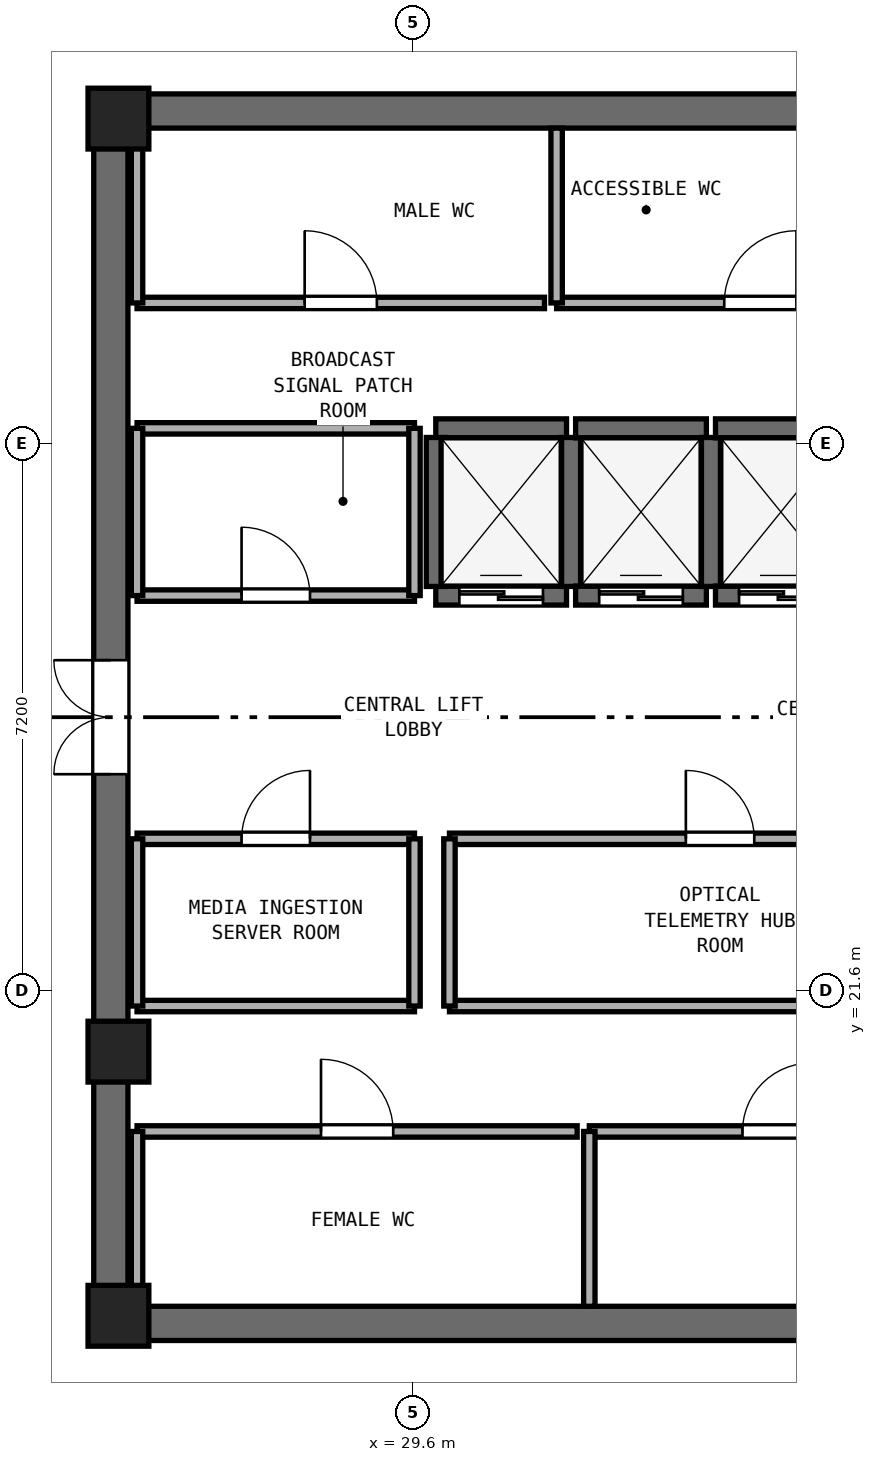
"""IFC4 building model, lengths in metres.
Left out: names, types, materials, properties, quantities, classifications, styles, units other than length and angle.
Written with IfcOpenShell. Run it as: python <this file> out.ifc"""

import sys

from ifc_helpers import new_model, si_unit, direction, frame, frame_2d, origin, origin_2d, place, context, subcontext, project, spatial, rectangle, extrude, element, fill, save


model = new_model("IFC4")
c1 = context("Model", 3, precision=1e-05, world=origin(), true_north=direction((0.0, 1.0)))
c2 = subcontext(c1, "Body", "Model", "MODEL_VIEW")
j1 = project(units=[si_unit("LENGTHUNIT", "METRE"), si_unit("PLANEANGLEUNIT", "RADIAN")], contexts=[c1])
p1 = place(None, origin())
s1 = spatial("IfcSite", under=j1, at=p1, CompositionType="ELEMENT")
p2 = place(p1, origin())
s2 = spatial("IfcBuilding", under=s1, at=p2, CompositionType="ELEMENT")
p3 = place(p2, frame((0.0, 0.0, 297.2)))
s3 = spatial("IfcBuildingStorey", under=s2, at=p3, CompositionType="ELEMENT", Elevation=297.2)
for number, where, z_axis, x_axis in (
    (1, (25.4, 17.225, 0.0), (0.0, 0.0, 1.0), (1.0, 0.0, 0.0)),
    (2, (25.4, 33.175, 0.0), (0.0, 0.0, 1.0), (1.0, 0.0, 0.0)),
):
    element("IfcWall", number, at=place(p3, frame(where, z_axis=z_axis, x_axis=x_axis)), inside=s3, PredefinedType="SHEAR", context=c2, shape_type="SweptSolid", body=[
        extrude(rectangle(XDim=23.2, YDim=0.45, at=frame_2d((11.6, 0.0))), origin(), (0.0, 0.0, 1.0), 3.54),
    ])
p4 = place(p3, frame((25.625, 17.45, 0.0), z_axis=(0.0, 0.0, 1.0), x_axis=(0.0, 1.0, 0.0)))
e3 = element("IfcWall", 3, at=p4, inside=s3, PredefinedType="SHEAR", context=c2, shape_type="SweptSolid", body=[
    extrude(rectangle(XDim=15.5, YDim=0.45, at=frame_2d((7.75, 0.0))), origin(), (0.0, 0.0, 1.0), 3.54),
])
p5 = place(p4, frame((7.0, 0.0, 0.0)))
e4 = element("IfcOpeningElement", 4, at=p5, cuts=e3, PredefinedType="OPENING", context=c2, shape_type="SweptSolid", body=[
    extrude(rectangle(XDim=1.5, YDim=2.15, at=frame_2d((0.75, 1.075))), frame((0.0, 0.235, 0.0), z_axis=(0.0, -1.0, 0.0), x_axis=(1.0, 0.0, 0.0)), (0.0, 0.0, 1.0), 0.47),
])
for number, where, z_axis, x_axis in (
    (5, (25.725, 17.325, 0.0), (0.0, 0.0, 1.0), (1.0, 0.0, 0.0)),
    (6, (25.725, 33.075, 0.0), (0.0, 0.0, 1.0), (1.0, 0.0, 0.0)),
    (7, (25.725, 20.8, 0.0), (0.0, 0.0, 1.0), (1.0, 0.0, 0.0)),
):
    element("IfcColumn", number, at=place(p3, frame(where, z_axis=z_axis, x_axis=x_axis)), inside=s3, PredefinedType="PILASTER", context=c2, shape_type="SweptSolid", body=[
        extrude(rectangle(XDim=0.8, YDim=0.8, at=origin_2d()), origin(), (0.0, 0.0, 1.0), 3.8),
    ])
p6 = place(p3, frame((29.9, 26.8, 0.0), z_axis=(0.0, 0.0, 1.0), x_axis=(1.0, 0.0, 0.0)))
e8 = element("IfcWall", 8, at=p6, inside=s3, PredefinedType="SHEAR", context=c2, shape_type="SweptSolid", body=[
    extrude(rectangle(XDim=1.72, YDim=0.25, at=frame_2d((0.86, 0.0))), origin(), (0.0, 0.0, 1.0), 3.54),
])
p7 = place(p6, frame((0.31, 0.0, 0.0)))
e9 = element("IfcOpeningElement", 9, at=p7, cuts=e8, PredefinedType="OPENING", context=c2, shape_type="SweptSolid", body=[
    extrude(rectangle(XDim=1.1, YDim=2.15, at=frame_2d((0.55, 1.075))), frame((0.0, 0.135, 0.0), z_axis=(0.0, -1.0, 0.0), x_axis=(1.0, 0.0, 0.0)), (0.0, 0.0, 1.0), 0.27),
])
p8 = place(p3, frame((29.9, 29.0, 0.0), z_axis=(0.0, 0.0, 1.0), x_axis=(1.0, 0.0, 0.0)))
e10 = element("IfcWall", 10, at=p8, inside=s3, PredefinedType="SHEAR", context=c2, shape_type="SweptSolid", body=[
    extrude(rectangle(XDim=1.72, YDim=0.25, at=frame_2d((0.86, 0.0))), origin(), (0.0, 0.0, 1.0), 3.54),
])
for number, where, z_axis, x_axis in (
    (11, (29.9, 26.92, 0.0), (0.0, 0.0, 1.0), (0.0, 1.0, 0.0)),
    (12, (31.68, 26.92, 0.0), (0.0, 0.0, 1.0), (0.0, 1.0, 0.0)),
):
    element("IfcWall", number, at=place(p3, frame(where, z_axis=z_axis, x_axis=x_axis)), inside=s3, PredefinedType="SHEAR", context=c2, shape_type="SweptSolid", body=[
        extrude(rectangle(XDim=1.96, YDim=0.25, at=frame_2d((0.98, 0.0))), origin(), (0.0, 0.0, 1.0), 3.54),
    ])
p9 = place(p3, frame((31.74, 26.8, 0.0), z_axis=(0.0, 0.0, 1.0), x_axis=(1.0, 0.0, 0.0)))
e13 = element("IfcWall", 13, at=p9, inside=s3, PredefinedType="SHEAR", context=c2, shape_type="SweptSolid", body=[
    extrude(rectangle(XDim=1.72, YDim=0.25, at=frame_2d((0.86, 0.0))), origin(), (0.0, 0.0, 1.0), 3.54),
])
p10 = place(p9, frame((0.31, 0.0, 0.0)))
e14 = element("IfcOpeningElement", 14, at=p10, cuts=e13, PredefinedType="OPENING", context=c2, shape_type="SweptSolid", body=[
    extrude(rectangle(XDim=1.1, YDim=2.15, at=frame_2d((0.55, 1.075))), frame((0.0, 0.135, 0.0), z_axis=(0.0, -1.0, 0.0), x_axis=(1.0, 0.0, 0.0)), (0.0, 0.0, 1.0), 0.27),
])
p11 = place(p3, frame((31.74, 29.0, 0.0), z_axis=(0.0, 0.0, 1.0), x_axis=(1.0, 0.0, 0.0)))
e15 = element("IfcWall", 15, at=p11, inside=s3, PredefinedType="SHEAR", context=c2, shape_type="SweptSolid", body=[
    extrude(rectangle(XDim=1.72, YDim=0.25, at=frame_2d((0.86, 0.0))), origin(), (0.0, 0.0, 1.0), 3.54),
])
p12 = place(p3, frame((33.52, 26.92, 0.0), z_axis=(0.0, 0.0, 1.0), x_axis=(0.0, 1.0, 0.0)))
e16 = element("IfcWall", 16, at=p12, inside=s3, PredefinedType="SHEAR", context=c2, shape_type="SweptSolid", body=[
    extrude(rectangle(XDim=1.96, YDim=0.25, at=frame_2d((0.98, 0.0))), origin(), (0.0, 0.0, 1.0), 3.54),
])
p13 = place(p3, frame((33.58, 26.8, 0.0), z_axis=(0.0, 0.0, 1.0), x_axis=(1.0, 0.0, 0.0)))
e17 = element("IfcWall", 17, at=p13, inside=s3, PredefinedType="SHEAR", context=c2, shape_type="SweptSolid", body=[
    extrude(rectangle(XDim=1.72, YDim=0.25, at=frame_2d((0.86, 0.0))), origin(), (0.0, 0.0, 1.0), 3.54),
])
p14 = place(p13, frame((0.31, 0.0, 0.0)))
e18 = element("IfcOpeningElement", 18, at=p14, cuts=e17, PredefinedType="OPENING", context=c2, shape_type="SweptSolid", body=[
    extrude(rectangle(XDim=1.1, YDim=2.15, at=frame_2d((0.55, 1.075))), frame((0.0, 0.135, 0.0), z_axis=(0.0, -1.0, 0.0), x_axis=(1.0, 0.0, 0.0)), (0.0, 0.0, 1.0), 0.27),
])
p15 = place(p3, frame((33.58, 29.0, 0.0), z_axis=(0.0, 0.0, 1.0), x_axis=(1.0, 0.0, 0.0)))
e19 = element("IfcWall", 19, at=p15, inside=s3, PredefinedType="SHEAR", context=c2, shape_type="SweptSolid", body=[
    extrude(rectangle(XDim=1.72, YDim=0.25, at=frame_2d((0.86, 0.0))), origin(), (0.0, 0.0, 1.0), 3.54),
])
p16 = place(p3, frame((25.97, 30.65, 0.0), z_axis=(0.0, 0.0, 1.0), x_axis=(1.0, 0.0, 0.0)))
e20 = element("IfcWall", 20, at=p16, inside=s3, PredefinedType="PARTITIONING", context=c2, shape_type="SweptSolid", body=[
    extrude(rectangle(XDim=5.36, YDim=0.15, at=frame_2d((2.68, 0.0))), origin(), (0.0, 0.0, 1.0), 3.54),
])
p17 = place(p16, frame((2.205, 0.0, 0.0)))
e21 = element("IfcOpeningElement", 21, at=p17, cuts=e20, PredefinedType="OPENING", context=c2, shape_type="SweptSolid", body=[
    extrude(rectangle(XDim=0.95, YDim=2.1, at=frame_2d((0.475, 1.05))), frame((0.0, 0.085, 0.0), z_axis=(0.0, -1.0, 0.0), x_axis=(1.0, 0.0, 0.0)), (0.0, 0.0, 1.0), 0.17),
])
p18 = place(p3, frame((25.97, 30.65, 0.0), z_axis=(0.0, 0.0, 1.0), x_axis=(0.0, 1.0, 0.0)))
e22 = element("IfcWall", 22, at=p18, inside=s3, PredefinedType="PARTITIONING", context=c2, shape_type="SweptSolid", body=[
    extrude(rectangle(XDim=2.3, YDim=0.15, at=frame_2d((1.15, 0.0))), origin(), (0.0, 0.0, 1.0), 2.64),
])
p19 = place(p3, frame((31.49, 30.65, 0.0), z_axis=(0.0, 0.0, 1.0), x_axis=(1.0, 0.0, 0.0)))
e23 = element("IfcWall", 23, at=p19, inside=s3, PredefinedType="PARTITIONING", context=c2, shape_type="SweptSolid", body=[
    extrude(rectangle(XDim=5.36, YDim=0.15, at=frame_2d((2.68, 0.0))), origin(), (0.0, 0.0, 1.0), 3.54),
])
p20 = place(p19, frame((2.205, 0.0, 0.0)))
e24 = element("IfcOpeningElement", 24, at=p20, cuts=e23, PredefinedType="OPENING", context=c2, shape_type="SweptSolid", body=[
    extrude(rectangle(XDim=0.95, YDim=2.1, at=frame_2d((0.475, 1.05))), frame((0.0, 0.085, 0.0), z_axis=(0.0, -1.0, 0.0), x_axis=(1.0, 0.0, 0.0)), (0.0, 0.0, 1.0), 0.17),
])
p21 = place(p3, frame((31.49, 30.65, 0.0), z_axis=(0.0, 0.0, 1.0), x_axis=(0.0, 1.0, 0.0)))
e25 = element("IfcWall", 25, at=p21, inside=s3, PredefinedType="PARTITIONING", context=c2, shape_type="SweptSolid", body=[
    extrude(rectangle(XDim=2.3, YDim=0.15, at=frame_2d((1.15, 0.0))), origin(), (0.0, 0.0, 1.0), 3.54),
])
p22 = place(p3, frame((25.97, 19.75, 0.0), z_axis=(0.0, 0.0, 1.0), x_axis=(1.0, 0.0, 0.0)))
e26 = element("IfcWall", 26, at=p22, inside=s3, PredefinedType="PARTITIONING", context=c2, shape_type="SweptSolid", body=[
    extrude(rectangle(XDim=5.79, YDim=0.15, at=frame_2d((2.895, 0.0))), origin(), (0.0, 0.0, 1.0), 3.54),
])
p23 = place(p22, frame((2.42, 0.0, 0.0)))
e27 = element("IfcOpeningElement", 27, at=p23, cuts=e26, PredefinedType="OPENING", context=c2, shape_type="SweptSolid", body=[
    extrude(rectangle(XDim=0.95, YDim=2.1, at=frame_2d((0.475, 1.05))), frame((0.0, 0.085, 0.0), z_axis=(0.0, -1.0, 0.0), x_axis=(1.0, 0.0, 0.0)), (0.0, 0.0, 1.0), 0.17),
])
p24 = place(p3, frame((25.97, 17.45, 0.0), z_axis=(0.0, 0.0, 1.0), x_axis=(0.0, 1.0, 0.0)))
e28 = element("IfcWall", 28, at=p24, inside=s3, PredefinedType="PARTITIONING", context=c2, shape_type="SweptSolid", body=[
    extrude(rectangle(XDim=2.3, YDim=0.15, at=frame_2d((1.15, 0.0))), origin(), (0.0, 0.0, 1.0), 2.64),
])
p25 = place(p3, frame((31.92, 19.75, 0.0), z_axis=(0.0, 0.0, 1.0), x_axis=(1.0, 0.0, 0.0)))
e29 = element("IfcWall", 29, at=p25, inside=s3, PredefinedType="PARTITIONING", context=c2, shape_type="SweptSolid", body=[
    extrude(rectangle(XDim=4.93, YDim=0.15, at=frame_2d((2.465, 0.0))), origin(), (0.0, 0.0, 1.0), 3.54),
])
p26 = place(p25, frame((2.015, 0.0, 0.0)))
e30 = element("IfcOpeningElement", 30, at=p26, cuts=e29, PredefinedType="OPENING", context=c2, shape_type="SweptSolid", body=[
    extrude(rectangle(XDim=0.9, YDim=2.1, at=frame_2d((0.45, 1.05))), frame((0.0, 0.085, 0.0), z_axis=(0.0, -1.0, 0.0), x_axis=(1.0, 0.0, 0.0)), (0.0, 0.0, 1.0), 0.17),
])
p27 = place(p3, frame((31.92, 17.45, 0.0), z_axis=(0.0, 0.0, 1.0), x_axis=(0.0, 1.0, 0.0)))
e31 = element("IfcWall", 31, at=p27, inside=s3, PredefinedType="PARTITIONING", context=c2, shape_type="SweptSolid", body=[
    extrude(rectangle(XDim=2.3, YDim=0.15, at=frame_2d((1.15, 0.0))), origin(), (0.0, 0.0, 1.0), 3.54),
])
p28 = place(p3, frame((25.97, 26.8, 0.0), z_axis=(0.0, 0.0, 1.0), x_axis=(1.0, 0.0, 0.0)))
e32 = element("IfcWall", 32, at=p28, inside=s3, PredefinedType="PARTITIONING", context=c2, shape_type="SweptSolid", body=[
    extrude(rectangle(XDim=3.65, YDim=0.15, at=frame_2d((1.825, 0.0))), origin(), (0.0, 0.0, 1.0), 3.54),
])
p29 = place(p28, frame((1.375, 0.0, 0.0)))
e33 = element("IfcOpeningElement", 33, at=p29, cuts=e32, PredefinedType="OPENING", context=c2, shape_type="SweptSolid", body=[
    extrude(rectangle(XDim=0.9, YDim=2.1, at=frame_2d((0.45, 1.05))), frame((0.0, 0.085, 0.0), z_axis=(0.0, -1.0, 0.0), x_axis=(1.0, 0.0, 0.0)), (0.0, 0.0, 1.0), 0.17),
])
p30 = place(p3, frame((25.97, 29.0, 0.0), z_axis=(0.0, 0.0, 1.0), x_axis=(1.0, 0.0, 0.0)))
e34 = element("IfcWall", 34, at=p30, inside=s3, PredefinedType="PARTITIONING", context=c2, shape_type="SweptSolid", body=[
    extrude(rectangle(XDim=3.65, YDim=0.15, at=frame_2d((1.825, 0.0))), origin(), (0.0, 0.0, 1.0), 3.54),
])
p31 = place(p3, frame((25.97, 26.8, 0.0), z_axis=(0.0, 0.0, 1.0), x_axis=(0.0, 1.0, 0.0)))
e35 = element("IfcWall", 35, at=p31, inside=s3, PredefinedType="PARTITIONING", context=c2, shape_type="SweptSolid", body=[
    extrude(rectangle(XDim=2.2, YDim=0.15, at=frame_2d((1.1, 0.0))), origin(), (0.0, 0.0, 1.0), 2.64),
])
p32 = place(p3, frame((29.62, 26.8, 0.0), z_axis=(0.0, 0.0, 1.0), x_axis=(0.0, 1.0, 0.0)))
e36 = element("IfcWall", 36, at=p32, inside=s3, PredefinedType="PARTITIONING", context=c2, shape_type="SweptSolid", body=[
    extrude(rectangle(XDim=2.2, YDim=0.15, at=frame_2d((1.1, 0.0))), origin(), (0.0, 0.0, 1.0), 3.54),
])
p33 = place(p3, frame((25.97, 21.4, 0.0), z_axis=(0.0, 0.0, 1.0), x_axis=(1.0, 0.0, 0.0)))
e37 = element("IfcWall", 37, at=p33, inside=s3, PredefinedType="PARTITIONING", context=c2, shape_type="SweptSolid", body=[
    extrude(rectangle(XDim=3.65, YDim=0.15, at=frame_2d((1.825, 0.0))), origin(), (0.0, 0.0, 1.0), 3.54),
])
p34 = place(p3, frame((25.97, 23.6, 0.0), z_axis=(0.0, 0.0, 1.0), x_axis=(1.0, 0.0, 0.0)))
e38 = element("IfcWall", 38, at=p34, inside=s3, PredefinedType="PARTITIONING", context=c2, shape_type="SweptSolid", body=[
    extrude(rectangle(XDim=3.65, YDim=0.15, at=frame_2d((1.825, 0.0))), origin(), (0.0, 0.0, 1.0), 3.54),
])
p35 = place(p34, frame((1.375, 0.0, 0.0)))
e39 = element("IfcOpeningElement", 39, at=p35, cuts=e38, PredefinedType="OPENING", context=c2, shape_type="SweptSolid", body=[
    extrude(rectangle(XDim=0.9, YDim=2.1, at=frame_2d((0.45, 1.05))), frame((0.0, 0.085, 0.0), z_axis=(0.0, -1.0, 0.0), x_axis=(1.0, 0.0, 0.0)), (0.0, 0.0, 1.0), 0.17),
])
p36 = place(p3, frame((25.97, 21.4, 0.0), z_axis=(0.0, 0.0, 1.0), x_axis=(0.0, 1.0, 0.0)))
e40 = element("IfcWall", 40, at=p36, inside=s3, PredefinedType="PARTITIONING", context=c2, shape_type="SweptSolid", body=[
    extrude(rectangle(XDim=2.2, YDim=0.15, at=frame_2d((1.1, 0.0))), origin(), (0.0, 0.0, 1.0), 2.64),
])
p37 = place(p3, frame((29.62, 21.4, 0.0), z_axis=(0.0, 0.0, 1.0), x_axis=(0.0, 1.0, 0.0)))
e41 = element("IfcWall", 41, at=p37, inside=s3, PredefinedType="PARTITIONING", context=c2, shape_type="SweptSolid", body=[
    extrude(rectangle(XDim=2.2, YDim=0.15, at=frame_2d((1.1, 0.0))), origin(), (0.0, 0.0, 1.0), 3.54),
])
p38 = place(p3, frame((30.08, 21.4, 0.0), z_axis=(0.0, 0.0, 1.0), x_axis=(1.0, 0.0, 0.0)))
e42 = element("IfcWall", 42, at=p38, inside=s3, PredefinedType="PARTITIONING", context=c2, shape_type="SweptSolid", body=[
    extrude(rectangle(XDim=7.12, YDim=0.15, at=frame_2d((3.56, 0.0))), origin(), (0.0, 0.0, 1.0), 3.54),
])
p39 = place(p3, frame((30.08, 23.6, 0.0), z_axis=(0.0, 0.0, 1.0), x_axis=(1.0, 0.0, 0.0)))
e43 = element("IfcWall", 43, at=p39, inside=s3, PredefinedType="PARTITIONING", context=c2, shape_type="SweptSolid", body=[
    extrude(rectangle(XDim=7.12, YDim=0.15, at=frame_2d((3.56, 0.0))), origin(), (0.0, 0.0, 1.0), 3.54),
])
p40 = place(p39, frame((3.11, 0.0, 0.0)))
e44 = element("IfcOpeningElement", 44, at=p40, cuts=e43, PredefinedType="OPENING", context=c2, shape_type="SweptSolid", body=[
    extrude(rectangle(XDim=0.9, YDim=2.1, at=frame_2d((0.45, 1.05))), frame((0.0, 0.085, 0.0), z_axis=(0.0, -1.0, 0.0), x_axis=(1.0, 0.0, 0.0)), (0.0, 0.0, 1.0), 0.17),
])
p41 = place(p3, frame((30.08, 21.4, 0.0), z_axis=(0.0, 0.0, 1.0), x_axis=(0.0, 1.0, 0.0)))
e45 = element("IfcWall", 45, at=p41, inside=s3, PredefinedType="PARTITIONING", context=c2, shape_type="SweptSolid", body=[
    extrude(rectangle(XDim=2.2, YDim=0.15, at=frame_2d((1.1, 0.0))), origin(), (0.0, 0.0, 1.0), 3.54),
])
p42 = place(p7, origin())
e46 = element("IfcDoor", 46, at=p42, inside=s3, OperationType="DOUBLE_DOOR_SLIDING", PredefinedType="DOOR", context=c2, shape_type="SweptSolid", body=[
    extrude(rectangle(XDim=1.1, YDim=2.15, at=frame_2d((0.55, 1.075))), frame((0.0, 0.025, 0.0), z_axis=(0.0, -1.0, 0.0), x_axis=(1.0, 0.0, 0.0)), (0.0, 0.0, 1.0), 0.05),
])
fill(e9, e46)
p43 = place(p10, origin())
e47 = element("IfcDoor", 47, at=p43, inside=s3, OperationType="DOUBLE_DOOR_SLIDING", PredefinedType="DOOR", context=c2, shape_type="SweptSolid", body=[
    extrude(rectangle(XDim=1.1, YDim=2.15, at=frame_2d((0.55, 1.075))), frame((0.0, 0.025, 0.0), z_axis=(0.0, -1.0, 0.0), x_axis=(1.0, 0.0, 0.0)), (0.0, 0.0, 1.0), 0.05),
])
fill(e14, e47)
p44 = place(p14, origin())
e48 = element("IfcDoor", 48, at=p44, inside=s3, OperationType="DOUBLE_DOOR_SLIDING", PredefinedType="DOOR", context=c2, shape_type="SweptSolid", body=[
    extrude(rectangle(XDim=1.1, YDim=2.15, at=frame_2d((0.55, 1.075))), frame((0.0, 0.025, 0.0), z_axis=(0.0, -1.0, 0.0), x_axis=(1.0, 0.0, 0.0)), (0.0, 0.0, 1.0), 0.05),
])
fill(e18, e48)
p45 = place(p5, origin())
e49 = element("IfcDoor", 49, at=p45, inside=s3, OperationType="DOUBLE_DOOR_SINGLE_SWING", PredefinedType="DOOR", context=c2, shape_type="SweptSolid", body=[
    extrude(rectangle(XDim=1.5, YDim=2.15, at=frame_2d((0.75, 1.075))), frame((0.0, 0.025, 0.0), z_axis=(0.0, -1.0, 0.0), x_axis=(1.0, 0.0, 0.0)), (0.0, 0.0, 1.0), 0.05),
])
fill(e4, e49)
p46 = place(p17, origin())
e50 = element("IfcDoor", 50, at=p46, inside=s3, OperationType="SINGLE_SWING_LEFT", PredefinedType="DOOR", context=c2, shape_type="SweptSolid", body=[
    extrude(rectangle(XDim=0.95, YDim=2.1, at=frame_2d((0.475, 1.05))), frame((0.0, 0.025, 0.0), z_axis=(0.0, -1.0, 0.0), x_axis=(1.0, 0.0, 0.0)), (0.0, 0.0, 1.0), 0.05),
])
fill(e21, e50)
p47 = place(p20, origin())
e51 = element("IfcDoor", 51, at=p47, inside=s3, OperationType="SINGLE_SWING_RIGHT", PredefinedType="DOOR", context=c2, shape_type="SweptSolid", body=[
    extrude(rectangle(XDim=0.95, YDim=2.1, at=frame_2d((0.475, 1.05))), frame((0.0, 0.025, 0.0), z_axis=(0.0, -1.0, 0.0), x_axis=(1.0, 0.0, 0.0)), (0.0, 0.0, 1.0), 0.05),
])
fill(e24, e51)
p48 = place(p23, origin())
e52 = element("IfcDoor", 52, at=p48, inside=s3, OperationType="SINGLE_SWING_LEFT", PredefinedType="DOOR", context=c2, shape_type="SweptSolid", body=[
    extrude(rectangle(XDim=0.95, YDim=2.1, at=frame_2d((0.475, 1.05))), frame((0.0, 0.025, 0.0), z_axis=(0.0, -1.0, 0.0), x_axis=(1.0, 0.0, 0.0)), (0.0, 0.0, 1.0), 0.05),
])
fill(e27, e52)
p49 = place(p26, origin())
e53 = element("IfcDoor", 53, at=p49, inside=s3, OperationType="SINGLE_SWING_RIGHT", PredefinedType="DOOR", context=c2, shape_type="SweptSolid", body=[
    extrude(rectangle(XDim=0.9, YDim=2.1, at=frame_2d((0.45, 1.05))), frame((0.0, 0.025, 0.0), z_axis=(0.0, -1.0, 0.0), x_axis=(1.0, 0.0, 0.0)), (0.0, 0.0, 1.0), 0.05),
])
fill(e30, e53)
p50 = place(p29, origin())
e54 = element("IfcDoor", 54, at=p50, inside=s3, OperationType="SINGLE_SWING_LEFT", PredefinedType="DOOR", context=c2, shape_type="SweptSolid", body=[
    extrude(rectangle(XDim=0.9, YDim=2.1, at=frame_2d((0.45, 1.05))), frame((0.0, 0.025, 0.0), z_axis=(0.0, -1.0, 0.0), x_axis=(1.0, 0.0, 0.0)), (0.0, 0.0, 1.0), 0.05),
])
fill(e33, e54)
p51 = place(p35, origin())
e55 = element("IfcDoor", 55, at=p51, inside=s3, OperationType="SINGLE_SWING_RIGHT", PredefinedType="DOOR", context=c2, shape_type="SweptSolid", body=[
    extrude(rectangle(XDim=0.9, YDim=2.1, at=frame_2d((0.45, 1.05))), frame((0.0, 0.025, 0.0), z_axis=(0.0, -1.0, 0.0), x_axis=(1.0, 0.0, 0.0)), (0.0, 0.0, 1.0), 0.05),
])
fill(e39, e55)
p52 = place(p40, origin())
e56 = element("IfcDoor", 56, at=p52, inside=s3, OperationType="SINGLE_SWING_LEFT", PredefinedType="DOOR", context=c2, shape_type="SweptSolid", body=[
    extrude(rectangle(XDim=0.9, YDim=2.1, at=frame_2d((0.45, 1.05))), frame((0.0, 0.025, 0.0), z_axis=(0.0, -1.0, 0.0), x_axis=(1.0, 0.0, 0.0)), (0.0, 0.0, 1.0), 0.05),
])
fill(e44, e56)
save(model, sys.argv[1])
